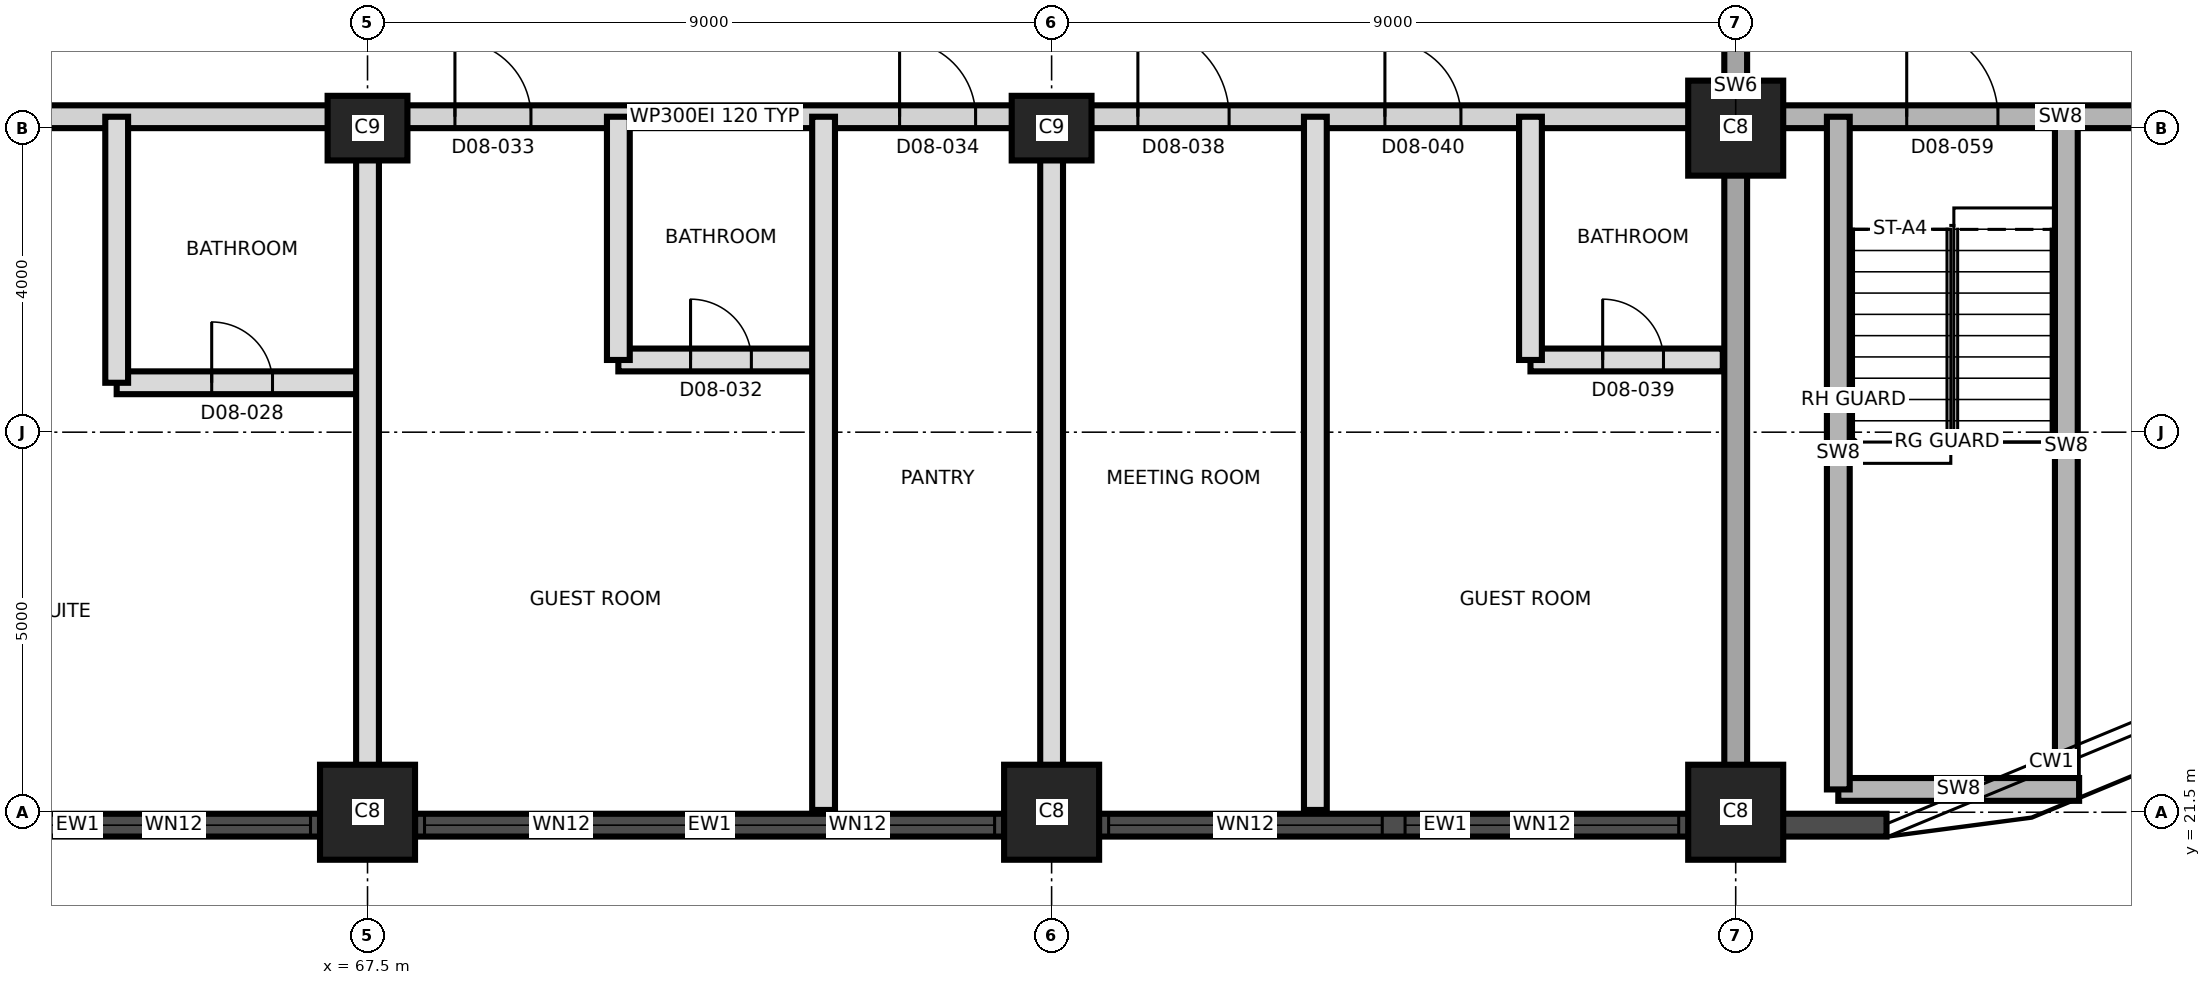
"""IFC4 building model, lengths in metres.
Left out: names, types, materials, properties, quantities, classifications, styles, units other than length and angle.
Written with IfcOpenShell. Run it as: python <this file> out.ifc"""

import sys

from ifc_helpers import new_model, si_unit, direction, frame, frame_2d, origin, origin_2d, place, context, subcontext, project, spatial, rectangle, extrude, element, fill, save


model = new_model("IFC4")
c1 = context("Model", 3, precision=1e-05, world=origin(), true_north=direction((0.0, 1.0)))
c2 = subcontext(c1, "Body", "Model", "MODEL_VIEW")
j1 = project(units=[si_unit("LENGTHUNIT", "METRE"), si_unit("PLANEANGLEUNIT", "RADIAN")], contexts=[c1])
p1 = place(None, origin())
s1 = spatial("IfcSite", under=j1, at=p1, CompositionType="ELEMENT")
p2 = place(p1, origin())
s2 = spatial("IfcBuilding", under=s1, at=p2, CompositionType="ELEMENT")
p3 = place(p2, frame((0.0, 0.0, 101.9)))
s3 = spatial("IfcBuildingStorey", under=s2, at=p3, CompositionType="ELEMENT", Elevation=101.9)
for number, where, z_axis, x_axis in (
    (1, (67.5, 21.5, 0.0), (0.0, 0.0, 1.0), (1.0, 0.0, 0.0)),
    (2, (76.5, 21.5, 0.0), (0.0, 0.0, 1.0), (1.0, 0.0, 0.0)),
    (3, (85.5, 21.5, 0.0), (0.0, 0.0, 1.0), (1.0, 0.0, 0.0)),
):
    element("IfcColumn", number, at=place(p3, frame(where, z_axis=z_axis, x_axis=x_axis)), inside=s3, PredefinedType="COLUMN", context=c2, shape_type="SweptSolid", body=[
        extrude(rectangle(XDim=1.25, YDim=1.25, at=origin_2d()), origin(), (0.0, 0.0, 1.0), 3.7),
    ])
for number, where, z_axis, x_axis in (
    (4, (67.5, 30.5, 0.0), (0.0, 0.0, 1.0), (1.0, 0.0, 0.0)),
    (5, (76.5, 30.5, 0.0), (0.0, 0.0, 1.0), (1.0, 0.0, 0.0)),
):
    element("IfcColumn", number, at=place(p3, frame(where, z_axis=z_axis, x_axis=x_axis)), inside=s3, PredefinedType="COLUMN", context=c2, shape_type="SweptSolid", body=[
        extrude(rectangle(XDim=1.05, YDim=0.85, at=origin_2d()), origin(), (0.0, 0.0, 1.0), 3.7),
    ])
p4 = place(p3, frame((85.5, 30.5, 0.0), z_axis=(0.0, 0.0, 1.0), x_axis=(1.0, 0.0, 0.0)))
e6 = element("IfcColumn", 6, at=p4, inside=s3, PredefinedType="COLUMN", context=c2, shape_type="SweptSolid", body=[
    extrude(rectangle(XDim=1.25, YDim=1.25, at=origin_2d()), origin(), (0.0, 0.0, 1.0), 3.7),
])
p5 = place(p3, frame((85.5, 21.53, 0.0), z_axis=(0.0, 0.0, 1.0), x_axis=(0.0, 1.0, 0.0)))
e7 = element("IfcWall", 7, at=p5, inside=s3, PredefinedType="SHEAR", context=c2, shape_type="SweptSolid", body=[
    extrude(rectangle(XDim=17.94, YDim=0.3, at=frame_2d((8.97, 0.0))), origin(), (0.0, 0.0, 1.0), 3.7),
])
p6 = place(p5, frame((10.17, 0.0, 0.0)))
e8 = element("IfcOpeningElement", 8, at=p6, cuts=e7, PredefinedType="OPENING", context=c2, shape_type="SweptSolid", body=[
    extrude(rectangle(XDim=1.4, YDim=2.1, at=frame_2d((0.7, 1.05))), frame((0.0, 0.16, 0.0), z_axis=(0.0, -1.0, 0.0), x_axis=(1.0, 0.0, 0.0)), (0.0, 0.0, 1.0), 0.32),
])
p7 = place(p3, frame((59.25, 21.33, 0.0), z_axis=(0.0, 0.0, 1.0), x_axis=(1.0, 0.0, 0.0)))
e9 = element("IfcWall", 9, at=p7, inside=s3, PredefinedType="SOLIDWALL", context=c2, shape_type="SweptSolid", body=[
    extrude(rectangle(XDim=8.875, YDim=0.3, at=frame_2d((4.438, 0.0))), origin(), (0.0, 0.0, 1.0), 3.4),
])
p8 = place(p7, frame((0.975, 0.0, 0.3)))
e10 = element("IfcOpeningElement", 10, at=p8, cuts=e9, PredefinedType="OPENING", context=c2, shape_type="SweptSolid", body=[
    extrude(rectangle(XDim=1.8, YDim=2.4, at=frame_2d((0.9, 1.2))), frame((0.0, 0.16, 0.0), z_axis=(0.0, -1.0, 0.0), x_axis=(1.0, 0.0, 0.0)), (0.0, 0.0, 1.0), 0.32),
])
p9 = place(p7, frame((3.9, 0.0, 0.9)))
e11 = element("IfcOpeningElement", 11, at=p9, cuts=e9, PredefinedType="OPENING", context=c2, shape_type="SweptSolid", body=[
    extrude(rectangle(XDim=3.6, YDim=1.5, at=frame_2d((1.8, 0.75))), frame((0.0, 0.16, 0.0), z_axis=(0.0, -1.0, 0.0), x_axis=(1.0, 0.0, 0.0)), (0.0, 0.0, 1.0), 0.32),
])
p10 = place(p3, frame((68.125, 21.33, 0.0), z_axis=(0.0, 0.0, 1.0), x_axis=(1.0, 0.0, 0.0)))
e12 = element("IfcWall", 12, at=p10, inside=s3, PredefinedType="SOLIDWALL", context=c2, shape_type="SweptSolid", body=[
    extrude(rectangle(XDim=7.75, YDim=0.3, at=frame_2d((3.875, 0.0))), origin(), (0.0, 0.0, 1.0), 2.75),
])
p11 = place(p10, frame((0.125, 0.0, 0.9)))
e13 = element("IfcOpeningElement", 13, at=p11, cuts=e12, PredefinedType="OPENING", context=c2, shape_type="SweptSolid", body=[
    extrude(rectangle(XDim=3.6, YDim=1.5, at=frame_2d((1.8, 0.75))), frame((0.0, 0.16, 0.0), z_axis=(0.0, -1.0, 0.0), x_axis=(1.0, 0.0, 0.0)), (0.0, 0.0, 1.0), 0.32),
])
p12 = place(p10, frame((4.025, 0.0, 0.9)))
e14 = element("IfcOpeningElement", 14, at=p12, cuts=e12, PredefinedType="OPENING", context=c2, shape_type="SweptSolid", body=[
    extrude(rectangle(XDim=3.6, YDim=1.5, at=frame_2d((1.8, 0.75))), frame((0.0, 0.16, 0.0), z_axis=(0.0, -1.0, 0.0), x_axis=(1.0, 0.0, 0.0)), (0.0, 0.0, 1.0), 0.32),
])
p13 = place(p3, frame((75.875, 21.33, 0.0), z_axis=(0.0, 0.0, 1.0), x_axis=(1.0, 0.0, 0.0)))
e15 = element("IfcWall", 15, at=p13, inside=s3, PredefinedType="SOLIDWALL", context=c2, shape_type="SweptSolid", body=[
    extrude(rectangle(XDim=11.609, YDim=0.3, at=frame_2d((5.805, 0.0))), origin(), (0.0, 0.0, 1.0), 3.4),
])
p14 = place(p13, frame((1.375, 0.0, 0.9)))
e16 = element("IfcOpeningElement", 16, at=p14, cuts=e15, PredefinedType="OPENING", context=c2, shape_type="SweptSolid", body=[
    extrude(rectangle(XDim=3.6, YDim=1.5, at=frame_2d((1.8, 0.75))), frame((0.0, 0.16, 0.0), z_axis=(0.0, -1.0, 0.0), x_axis=(1.0, 0.0, 0.0)), (0.0, 0.0, 1.0), 0.32),
])
p15 = place(p13, frame((5.275, 0.0, 0.9)))
e17 = element("IfcOpeningElement", 17, at=p15, cuts=e15, PredefinedType="OPENING", context=c2, shape_type="SweptSolid", body=[
    extrude(rectangle(XDim=3.6, YDim=1.5, at=frame_2d((1.8, 0.75))), frame((0.0, 0.16, 0.0), z_axis=(0.0, -1.0, 0.0), x_axis=(1.0, 0.0, 0.0)), (0.0, 0.0, 1.0), 0.32),
])
p16 = place(p3, frame((86.85, 21.8, 0.0), z_axis=(0.0, 0.0, 1.0), x_axis=(1.0, 0.0, 0.0)))
e18 = element("IfcWall", 18, at=p16, inside=s3, PredefinedType="SHEAR", context=c2, shape_type="SweptSolid", body=[
    extrude(rectangle(XDim=3.168, YDim=0.3, at=frame_2d((1.584, 0.0))), origin(), (0.0, 0.0, 1.0), 3.4),
])
p17 = place(p3, frame((64.2, 27.15, 0.0), z_axis=(0.0, 0.0, 1.0), x_axis=(1.0, 0.0, 0.0)))
e19 = element("IfcWall", 19, at=p17, inside=s3, PredefinedType="PARTITIONING", context=c2, shape_type="SweptSolid", body=[
    extrude(rectangle(XDim=3.3, YDim=0.3, at=frame_2d((1.65, 0.0))), origin(), (0.0, 0.0, 1.0), 3.4),
])
p18 = place(p17, frame((1.25, 0.0, 0.0)))
e20 = element("IfcOpeningElement", 20, at=p18, cuts=e19, PredefinedType="OPENING", context=c2, shape_type="SweptSolid", body=[
    extrude(rectangle(XDim=0.8, YDim=2.1, at=frame_2d((0.4, 1.05))), frame((0.0, 0.16, 0.0), z_axis=(0.0, -1.0, 0.0), x_axis=(1.0, 0.0, 0.0)), (0.0, 0.0, 1.0), 0.32),
])
p19 = place(p3, frame((70.8, 27.45, 0.0), z_axis=(0.0, 0.0, 1.0), x_axis=(1.0, 0.0, 0.0)))
e21 = element("IfcWall", 21, at=p19, inside=s3, PredefinedType="PARTITIONING", context=c2, shape_type="SweptSolid", body=[
    extrude(rectangle(XDim=2.7, YDim=0.3, at=frame_2d((1.35, 0.0))), origin(), (0.0, 0.0, 1.0), 3.4),
])
p20 = place(p19, frame((0.95, 0.0, 0.0)))
e22 = element("IfcOpeningElement", 22, at=p20, cuts=e21, PredefinedType="OPENING", context=c2, shape_type="SweptSolid", body=[
    extrude(rectangle(XDim=0.8, YDim=2.1, at=frame_2d((0.4, 1.05))), frame((0.0, 0.16, 0.0), z_axis=(0.0, -1.0, 0.0), x_axis=(1.0, 0.0, 0.0)), (0.0, 0.0, 1.0), 0.32),
])
p21 = place(p3, frame((82.8, 27.45, 0.0), z_axis=(0.0, 0.0, 1.0), x_axis=(1.0, 0.0, 0.0)))
e23 = element("IfcWall", 23, at=p21, inside=s3, PredefinedType="PARTITIONING", context=c2, shape_type="SweptSolid", body=[
    extrude(rectangle(XDim=2.53, YDim=0.3, at=frame_2d((1.265, 0.0))), origin(), (0.0, 0.0, 1.0), 3.4),
])
p22 = place(p21, frame((0.95, 0.0, 0.0)))
e24 = element("IfcOpeningElement", 24, at=p22, cuts=e23, PredefinedType="OPENING", context=c2, shape_type="SweptSolid", body=[
    extrude(rectangle(XDim=0.8, YDim=2.1, at=frame_2d((0.4, 1.05))), frame((0.0, 0.16, 0.0), z_axis=(0.0, -1.0, 0.0), x_axis=(1.0, 0.0, 0.0)), (0.0, 0.0, 1.0), 0.32),
])
p23 = place(p3, frame((58.8, 30.65, 0.0), z_axis=(0.0, 0.0, 1.0), x_axis=(1.0, 0.0, 0.0)))
e25 = element("IfcWall", 25, at=p23, inside=s3, PredefinedType="PARTITIONING", context=c2, shape_type="SweptSolid", body=[
    extrude(rectangle(XDim=26.53, YDim=0.3, at=frame_2d((13.265, 0.0))), origin(), (0.0, 0.0, 1.0), 3.4),
])
p24 = place(p23, frame((2.05, 0.0, 0.0)))
e26 = element("IfcOpeningElement", 26, at=p24, cuts=e25, PredefinedType="OPENING", context=c2, shape_type="SweptSolid", body=[
    extrude(rectangle(XDim=1.0, YDim=2.4, at=frame_2d((0.5, 1.2))), frame((0.0, 0.16, 0.0), z_axis=(0.0, -1.0, 0.0), x_axis=(1.0, 0.0, 0.0)), (0.0, 0.0, 1.0), 0.32),
])
p25 = place(p23, frame((9.85, 0.0, 0.0)))
e27 = element("IfcOpeningElement", 27, at=p25, cuts=e25, PredefinedType="OPENING", context=c2, shape_type="SweptSolid", body=[
    extrude(rectangle(XDim=1.0, YDim=2.1, at=frame_2d((0.5, 1.05))), frame((0.0, 0.16, 0.0), z_axis=(0.0, -1.0, 0.0), x_axis=(1.0, 0.0, 0.0)), (0.0, 0.0, 1.0), 0.32),
])
p26 = place(p23, frame((15.7, 0.0, 0.0)))
e28 = element("IfcOpeningElement", 28, at=p26, cuts=e25, PredefinedType="OPENING", context=c2, shape_type="SweptSolid", body=[
    extrude(rectangle(XDim=1.0, YDim=2.1, at=frame_2d((0.5, 1.05))), frame((0.0, 0.16, 0.0), z_axis=(0.0, -1.0, 0.0), x_axis=(1.0, 0.0, 0.0)), (0.0, 0.0, 1.0), 0.32),
])
p27 = place(p23, frame((18.835, 0.0, 0.0)))
e29 = element("IfcOpeningElement", 29, at=p27, cuts=e25, PredefinedType="OPENING", context=c2, shape_type="SweptSolid", body=[
    extrude(rectangle(XDim=1.2, YDim=2.1, at=frame_2d((0.6, 1.05))), frame((0.0, 0.16, 0.0), z_axis=(0.0, -1.0, 0.0), x_axis=(1.0, 0.0, 0.0)), (0.0, 0.0, 1.0), 0.32),
])
p28 = place(p23, frame((22.085, 0.0, 0.0)))
e30 = element("IfcOpeningElement", 30, at=p28, cuts=e25, PredefinedType="OPENING", context=c2, shape_type="SweptSolid", body=[
    extrude(rectangle(XDim=1.0, YDim=2.1, at=frame_2d((0.5, 1.05))), frame((0.0, 0.16, 0.0), z_axis=(0.0, -1.0, 0.0), x_axis=(1.0, 0.0, 0.0)), (0.0, 0.0, 1.0), 0.32),
])
p29 = place(p3, frame((85.67, 30.65, 0.0), z_axis=(0.0, 0.0, 1.0), x_axis=(1.0, 0.0, 0.0)))
e31 = element("IfcWall", 31, at=p29, inside=s3, PredefinedType="SHEAR", context=c2, shape_type="SweptSolid", body=[
    extrude(rectangle(XDim=8.205, YDim=0.3, at=frame_2d((4.103, 0.0))), origin(), (0.0, 0.0, 1.0), 3.4),
])
p30 = place(p29, frame((2.08, 0.0, 0.0)))
e32 = element("IfcOpeningElement", 32, at=p30, cuts=e31, PredefinedType="OPENING", context=c2, shape_type="SweptSolid", body=[
    extrude(rectangle(XDim=1.2, YDim=2.1, at=frame_2d((0.6, 1.05))), frame((0.0, 0.16, 0.0), z_axis=(0.0, -1.0, 0.0), x_axis=(1.0, 0.0, 0.0)), (0.0, 0.0, 1.0), 0.32),
])
p31 = place(p29, frame((5.63, 0.0, 0.0)))
e33 = element("IfcOpeningElement", 33, at=p31, cuts=e31, PredefinedType="OPENING", context=c2, shape_type="SweptSolid", body=[
    extrude(rectangle(XDim=1.0, YDim=2.1, at=frame_2d((0.5, 1.05))), frame((0.0, 0.16, 0.0), z_axis=(0.0, -1.0, 0.0), x_axis=(1.0, 0.0, 0.0)), (0.0, 0.0, 1.0), 0.32),
])
p32 = place(p3, frame((64.2, 27.15, 0.0), z_axis=(0.0, 0.0, 1.0), x_axis=(0.0, 1.0, 0.0)))
e34 = element("IfcWall", 34, at=p32, inside=s3, PredefinedType="PARTITIONING", context=c2, shape_type="SweptSolid", body=[
    extrude(rectangle(XDim=3.5, YDim=0.3, at=frame_2d((1.75, 0.0))), origin(), (0.0, 0.0, 1.0), 3.4),
])
p33 = place(p3, frame((67.5, 21.53, 0.0), z_axis=(0.0, 0.0, 1.0), x_axis=(0.0, 1.0, 0.0)))
e35 = element("IfcWall", 35, at=p33, inside=s3, PredefinedType="PARTITIONING", context=c2, shape_type="SweptSolid", body=[
    extrude(rectangle(XDim=9.12, YDim=0.3, at=frame_2d((4.56, 0.0))), origin(), (0.0, 0.0, 1.0), 3.4),
])
p34 = place(p3, frame((70.8, 27.45, 0.0), z_axis=(0.0, 0.0, 1.0), x_axis=(0.0, 1.0, 0.0)))
e36 = element("IfcWall", 36, at=p34, inside=s3, PredefinedType="PARTITIONING", context=c2, shape_type="SweptSolid", body=[
    extrude(rectangle(XDim=3.2, YDim=0.3, at=frame_2d((1.6, 0.0))), origin(), (0.0, 0.0, 1.0), 3.4),
])
for number, where, z_axis, x_axis in (
    (37, (73.5, 21.53, 0.0), (0.0, 0.0, 1.0), (0.0, 1.0, 0.0)),
    (38, (76.5, 21.53, 0.0), (0.0, 0.0, 1.0), (0.0, 1.0, 0.0)),
    (39, (79.97, 21.53, 0.0), (0.0, 0.0, 1.0), (0.0, 1.0, 0.0)),
):
    element("IfcWall", number, at=place(p3, frame(where, z_axis=z_axis, x_axis=x_axis)), inside=s3, PredefinedType="PARTITIONING", context=c2, shape_type="SweptSolid", body=[
        extrude(rectangle(XDim=9.12, YDim=0.3, at=frame_2d((4.56, 0.0))), origin(), (0.0, 0.0, 1.0), 3.4),
    ])
p35 = place(p3, frame((82.8, 27.45, 0.0), z_axis=(0.0, 0.0, 1.0), x_axis=(0.0, 1.0, 0.0)))
e40 = element("IfcWall", 40, at=p35, inside=s3, PredefinedType="PARTITIONING", context=c2, shape_type="SweptSolid", body=[
    extrude(rectangle(XDim=3.2, YDim=0.3, at=frame_2d((1.6, 0.0))), origin(), (0.0, 0.0, 1.0), 3.4),
])
p36 = place(p3, frame((86.85, 21.8, 0.0), z_axis=(0.0, 0.0, 1.0), x_axis=(0.0, 1.0, 0.0)))
e41 = element("IfcWall", 41, at=p36, inside=s3, PredefinedType="SHEAR", context=c2, shape_type="SweptSolid", body=[
    extrude(rectangle(XDim=8.85, YDim=0.3, at=frame_2d((4.425, 0.0))), origin(), (0.0, 0.0, 1.0), 3.4),
])
p37 = place(p3, frame((89.85, 21.997, 0.0), z_axis=(0.0, 0.0, 1.0), x_axis=(0.0, 1.0, 0.0)))
e42 = element("IfcWall", 42, at=p37, inside=s3, PredefinedType="SHEAR", context=c2, shape_type="SweptSolid", body=[
    extrude(rectangle(XDim=8.653, YDim=0.3, at=frame_2d((4.326, 0.0))), origin(), (0.0, 0.0, 1.0), 3.4),
])
p38 = place(p9, origin())
e43 = element("IfcWindow", 43, at=p38, inside=s3, PartitioningType="SINGLE_PANEL", PredefinedType="WINDOW", context=c2, shape_type="SweptSolid", body=[
    extrude(rectangle(XDim=3.6, YDim=1.5, at=frame_2d((1.8, 0.75))), frame((0.0, 0.03, 0.0), z_axis=(0.0, -1.0, 0.0), x_axis=(1.0, 0.0, 0.0)), (0.0, 0.0, 1.0), 0.06),
])
fill(e11, e43)
p39 = place(p11, origin())
e44 = element("IfcWindow", 44, at=p39, inside=s3, PartitioningType="SINGLE_PANEL", PredefinedType="WINDOW", context=c2, shape_type="SweptSolid", body=[
    extrude(rectangle(XDim=3.6, YDim=1.5, at=frame_2d((1.8, 0.75))), frame((0.0, 0.03, 0.0), z_axis=(0.0, -1.0, 0.0), x_axis=(1.0, 0.0, 0.0)), (0.0, 0.0, 1.0), 0.06),
])
fill(e13, e44)
p40 = place(p12, origin())
e45 = element("IfcWindow", 45, at=p40, inside=s3, PartitioningType="SINGLE_PANEL", PredefinedType="WINDOW", context=c2, shape_type="SweptSolid", body=[
    extrude(rectangle(XDim=3.6, YDim=1.5, at=frame_2d((1.8, 0.75))), frame((0.0, 0.03, 0.0), z_axis=(0.0, -1.0, 0.0), x_axis=(1.0, 0.0, 0.0)), (0.0, 0.0, 1.0), 0.06),
])
fill(e14, e45)
p41 = place(p14, origin())
e46 = element("IfcWindow", 46, at=p41, inside=s3, PartitioningType="SINGLE_PANEL", PredefinedType="WINDOW", context=c2, shape_type="SweptSolid", body=[
    extrude(rectangle(XDim=3.6, YDim=1.5, at=frame_2d((1.8, 0.75))), frame((0.0, 0.03, 0.0), z_axis=(0.0, -1.0, 0.0), x_axis=(1.0, 0.0, 0.0)), (0.0, 0.0, 1.0), 0.06),
])
fill(e16, e46)
p42 = place(p15, origin())
e47 = element("IfcWindow", 47, at=p42, inside=s3, PartitioningType="SINGLE_PANEL", PredefinedType="WINDOW", context=c2, shape_type="SweptSolid", body=[
    extrude(rectangle(XDim=3.6, YDim=1.5, at=frame_2d((1.8, 0.75))), frame((0.0, 0.03, 0.0), z_axis=(0.0, -1.0, 0.0), x_axis=(1.0, 0.0, 0.0)), (0.0, 0.0, 1.0), 0.06),
])
fill(e17, e47)
p43 = place(p18, origin())
e48 = element("IfcDoor", 48, at=p43, inside=s3, OperationType="SINGLE_SWING_LEFT", PredefinedType="DOOR", context=c2, shape_type="SweptSolid", body=[
    extrude(rectangle(XDim=0.8, YDim=2.1, at=frame_2d((0.4, 1.05))), frame((0.0, 0.025, 0.0), z_axis=(0.0, -1.0, 0.0), x_axis=(1.0, 0.0, 0.0)), (0.0, 0.0, 1.0), 0.05),
])
fill(e20, e48)
p44 = place(p20, origin())
e49 = element("IfcDoor", 49, at=p44, inside=s3, OperationType="SINGLE_SWING_RIGHT", PredefinedType="DOOR", context=c2, shape_type="SweptSolid", body=[
    extrude(rectangle(XDim=0.8, YDim=2.1, at=frame_2d((0.4, 1.05))), frame((0.0, 0.025, 0.0), z_axis=(0.0, -1.0, 0.0), x_axis=(1.0, 0.0, 0.0)), (0.0, 0.0, 1.0), 0.05),
])
fill(e22, e49)
p45 = place(p25, origin())
e50 = element("IfcDoor", 50, at=p45, inside=s3, OperationType="SINGLE_SWING_LEFT", PredefinedType="DOOR", context=c2, shape_type="SweptSolid", body=[
    extrude(rectangle(XDim=1.0, YDim=2.1, at=frame_2d((0.5, 1.05))), frame((0.0, 0.025, 0.0), z_axis=(0.0, -1.0, 0.0), x_axis=(1.0, 0.0, 0.0)), (0.0, 0.0, 1.0), 0.05),
])
fill(e27, e50)
p46 = place(p26, origin())
e51 = element("IfcDoor", 51, at=p46, inside=s3, OperationType="SINGLE_SWING_LEFT", PredefinedType="DOOR", context=c2, shape_type="SweptSolid", body=[
    extrude(rectangle(XDim=1.0, YDim=2.1, at=frame_2d((0.5, 1.05))), frame((0.0, 0.025, 0.0), z_axis=(0.0, -1.0, 0.0), x_axis=(1.0, 0.0, 0.0)), (0.0, 0.0, 1.0), 0.05),
])
fill(e28, e51)
p47 = place(p27, origin())
e52 = element("IfcDoor", 52, at=p47, inside=s3, OperationType="SINGLE_SWING_LEFT", PredefinedType="DOOR", context=c2, shape_type="SweptSolid", body=[
    extrude(rectangle(XDim=1.2, YDim=2.1, at=frame_2d((0.6, 1.05))), frame((0.0, 0.025, 0.0), z_axis=(0.0, -1.0, 0.0), x_axis=(1.0, 0.0, 0.0)), (0.0, 0.0, 1.0), 0.05),
])
fill(e29, e52)
p48 = place(p22, origin())
e53 = element("IfcDoor", 53, at=p48, inside=s3, OperationType="SINGLE_SWING_LEFT", PredefinedType="DOOR", context=c2, shape_type="SweptSolid", body=[
    extrude(rectangle(XDim=0.8, YDim=2.1, at=frame_2d((0.4, 1.05))), frame((0.0, 0.025, 0.0), z_axis=(0.0, -1.0, 0.0), x_axis=(1.0, 0.0, 0.0)), (0.0, 0.0, 1.0), 0.05),
])
fill(e24, e53)
p49 = place(p28, origin())
e54 = element("IfcDoor", 54, at=p49, inside=s3, OperationType="SINGLE_SWING_RIGHT", PredefinedType="DOOR", context=c2, shape_type="SweptSolid", body=[
    extrude(rectangle(XDim=1.0, YDim=2.1, at=frame_2d((0.5, 1.05))), frame((0.0, 0.025, 0.0), z_axis=(0.0, -1.0, 0.0), x_axis=(1.0, 0.0, 0.0)), (0.0, 0.0, 1.0), 0.05),
])
fill(e30, e54)
p50 = place(p30, origin())
e55 = element("IfcDoor", 55, at=p50, inside=s3, OperationType="SINGLE_SWING_LEFT", PredefinedType="DOOR", context=c2, shape_type="SweptSolid", body=[
    extrude(rectangle(XDim=1.2, YDim=2.1, at=frame_2d((0.6, 1.05))), frame((0.0, 0.025, 0.0), z_axis=(0.0, -1.0, 0.0), x_axis=(1.0, 0.0, 0.0)), (0.0, 0.0, 1.0), 0.05),
])
fill(e32, e55)
save(model, sys.argv[1])
